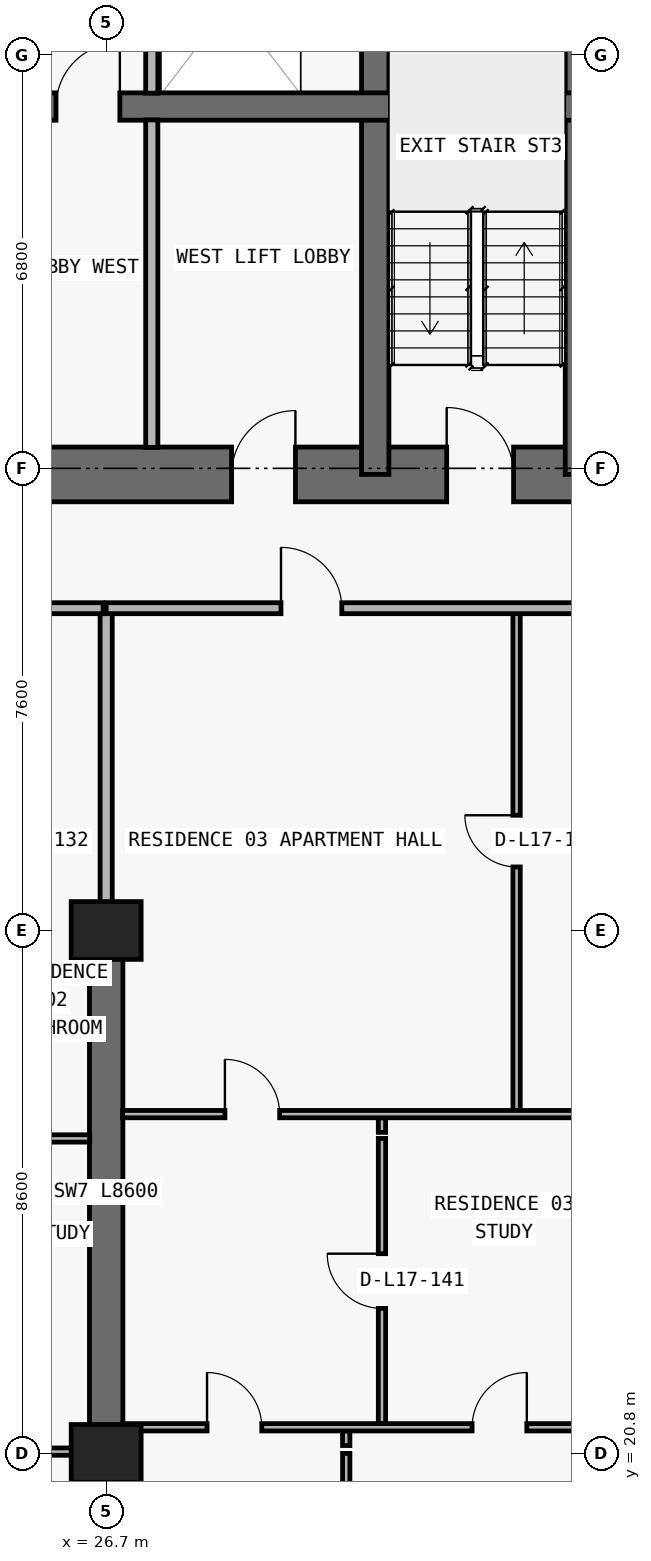
"""IFC4 building model, lengths in metres.
Left out: names, types, materials, properties, quantities, classifications, styles, units other than length and angle.
Written with IfcOpenShell. Run it as: python <this file> out.ifc"""

import sys

from ifc_helpers import new_model, si_unit, direction, frame, frame_2d, origin, origin_2d, place, context, subcontext, project, spatial, rectangle, extrude, element, fill, save


model = new_model("IFC4")
c1 = context("Model", 3, precision=1e-05, world=origin(), true_north=direction((0.0, 1.0)))
c2 = subcontext(c1, "Body", "Model", "MODEL_VIEW")
j1 = project(units=[si_unit("LENGTHUNIT", "METRE"), si_unit("PLANEANGLEUNIT", "RADIAN")], contexts=[c1])
p1 = place(None, origin())
s1 = spatial("IfcSite", under=j1, at=p1, CompositionType="ELEMENT")
p2 = place(p1, origin())
s2 = spatial("IfcBuilding", under=s1, at=p2, CompositionType="ELEMENT")
p3 = place(p2, frame((0.0, 0.0, 66.3)))
s3 = spatial("IfcBuildingStorey", under=s2, at=p3, CompositionType="ELEMENT", Elevation=66.3)
for number, where, z_axis, x_axis in (
    (1, (26.7, 20.8, 0.0), (0.0, 0.0, 1.0), (1.0, 0.0, 0.0)),
    (2, (26.7, 29.4, 0.0), (0.0, 0.0, 1.0), (1.0, 0.0, 0.0)),
):
    element("IfcColumn", number, at=place(p3, frame(where, z_axis=z_axis, x_axis=x_axis)), inside=s3, PredefinedType="COLUMN", context=c2, shape_type="SweptSolid", body=[
        extrude(rectangle(XDim=1.15, YDim=0.95, at=origin_2d()), origin(), (0.0, 0.0, 1.0), 3.05),
    ])
p4 = place(p3, frame((17.75, 36.9, 0.0), z_axis=(0.0, 0.0, 1.0), x_axis=(1.0, 0.0, 0.0)))
e3 = element("IfcWall", 3, at=p4, inside=s3, PredefinedType="SHEAR", context=c2, shape_type="SweptSolid", body=[
    extrude(rectangle(XDim=42.3, YDim=0.9, at=frame_2d((21.15, 0.0))), origin(), (0.0, 0.0, 1.0), 3.05),
])
p5 = place(p4, frame((14.55, 0.0, 0.0)))
e4 = element("IfcOpeningElement", 4, at=p5, cuts=e3, PredefinedType="OPENING", context=c2, shape_type="SweptSolid", body=[
    extrude(rectangle(XDim=1.1, YDim=2.15, at=frame_2d((0.55, 1.075))), frame((0.0, 0.46, 0.0), z_axis=(0.0, -1.0, 0.0), x_axis=(1.0, 0.0, 0.0)), (0.0, 0.0, 1.0), 0.92),
])
p6 = place(p4, frame((6.4, 0.0, 0.0)))
e5 = element("IfcOpeningElement", 5, at=p6, cuts=e3, PredefinedType="OPENING", context=c2, shape_type="SweptSolid", body=[
    extrude(rectangle(XDim=1.05, YDim=2.15, at=frame_2d((0.525, 1.075))), frame((0.0, 0.46, 0.0), z_axis=(0.0, -1.0, 0.0), x_axis=(1.0, 0.0, 0.0)), (0.0, 0.0, 1.0), 0.92),
])
p7 = place(p4, frame((34.9, 0.0, 0.0)))
e6 = element("IfcOpeningElement", 6, at=p7, cuts=e3, PredefinedType="OPENING", context=c2, shape_type="SweptSolid", body=[
    extrude(rectangle(XDim=1.05, YDim=2.15, at=frame_2d((0.525, 1.075))), frame((0.0, 0.46, 0.0), z_axis=(0.0, -1.0, 0.0), x_axis=(1.0, 0.0, 0.0)), (0.0, 0.0, 1.0), 0.92),
])
p8 = place(p4, frame((11.012, 0.0, 0.0)))
e7 = element("IfcOpeningElement", 7, at=p8, cuts=e3, PredefinedType="OPENING", context=c2, shape_type="SweptSolid", body=[
    extrude(rectangle(XDim=1.05, YDim=2.15, at=frame_2d((0.525, 1.075))), frame((0.0, 0.46, 0.0), z_axis=(0.0, -1.0, 0.0), x_axis=(1.0, 0.0, 0.0)), (0.0, 0.0, 1.0), 0.92),
])
p9 = place(p4, frame((24.25, 0.0, 0.0)))
e8 = element("IfcOpeningElement", 8, at=p9, cuts=e3, PredefinedType="OPENING", context=c2, shape_type="SweptSolid", body=[
    extrude(rectangle(XDim=1.05, YDim=2.15, at=frame_2d((0.525, 1.075))), frame((0.0, 0.46, 0.0), z_axis=(0.0, -1.0, 0.0), x_axis=(1.0, 0.0, 0.0)), (0.0, 0.0, 1.0), 0.92),
])
p10 = place(p3, frame((31.125, 36.9, 0.0), z_axis=(0.0, 0.0, 1.0), x_axis=(0.0, 1.0, 0.0)))
e9 = element("IfcWall", 9, at=p10, inside=s3, PredefinedType="SHEAR", context=c2, shape_type="SweptSolid", body=[
    extrude(rectangle(XDim=9.675, YDim=0.45, at=frame_2d((4.837, 0.0))), origin(), (0.0, 0.0, 1.0), 3.05),
])
p11 = place(p3, frame((34.6, 36.9, 0.0), z_axis=(0.0, 0.0, 1.0), x_axis=(0.0, 1.0, 0.0)))
e10 = element("IfcWall", 10, at=p11, inside=s3, PredefinedType="SHEAR", context=c2, shape_type="SweptSolid", body=[
    extrude(rectangle(XDim=9.675, YDim=0.7, at=frame_2d((4.837, 0.0))), origin(), (0.0, 0.0, 1.0), 3.05),
])
p12 = place(p3, frame((22.25, 42.95, 0.0), z_axis=(0.0, 0.0, 1.0), x_axis=(1.0, 0.0, 0.0)))
e11 = element("IfcWall", 11, at=p12, inside=s3, PredefinedType="SHEAR", context=c2, shape_type="SweptSolid", body=[
    extrude(rectangle(XDim=33.3, YDim=0.45, at=frame_2d((16.65, 0.0))), origin(), (0.0, 0.0, 1.0), 3.05),
])
p13 = place(p12, frame((1.05, 0.0, 0.0)))
e12 = element("IfcOpeningElement", 12, at=p13, cuts=e11, PredefinedType="OPENING", context=c2, shape_type="SweptSolid", body=[
    extrude(rectangle(XDim=1.2, YDim=2.2, at=frame_2d((0.6, 1.1))), frame((0.0, 0.235, 0.0), z_axis=(0.0, -1.0, 0.0), x_axis=(1.0, 0.0, 0.0)), (0.0, 0.0, 1.0), 0.47),
])
p14 = place(p12, frame((31.05, 0.0, 0.0)))
e13 = element("IfcOpeningElement", 13, at=p14, cuts=e11, PredefinedType="OPENING", context=c2, shape_type="SweptSolid", body=[
    extrude(rectangle(XDim=1.2, YDim=2.2, at=frame_2d((0.6, 1.1))), frame((0.0, 0.235, 0.0), z_axis=(0.0, -1.0, 0.0), x_axis=(1.0, 0.0, 0.0)), (0.0, 0.0, 1.0), 0.47),
])
p15 = place(p12, frame((13.5, 0.0, 0.0)))
e14 = element("IfcOpeningElement", 14, at=p15, cuts=e11, PredefinedType="OPENING", context=c2, shape_type="SweptSolid", body=[
    extrude(rectangle(XDim=1.1, YDim=2.2, at=frame_2d((0.55, 1.1))), frame((0.0, 0.235, 0.0), z_axis=(0.0, -1.0, 0.0), x_axis=(1.0, 0.0, 0.0)), (0.0, 0.0, 1.0), 0.47),
])
p16 = place(p12, frame((16.1, 0.0, 0.0)))
e15 = element("IfcOpeningElement", 15, at=p16, cuts=e11, PredefinedType="OPENING", context=c2, shape_type="SweptSolid", body=[
    extrude(rectangle(XDim=1.1, YDim=2.2, at=frame_2d((0.55, 1.1))), frame((0.0, 0.235, 0.0), z_axis=(0.0, -1.0, 0.0), x_axis=(1.0, 0.0, 0.0)), (0.0, 0.0, 1.0), 0.47),
])
p17 = place(p12, frame((18.7, 0.0, 0.0)))
e16 = element("IfcOpeningElement", 16, at=p17, cuts=e11, PredefinedType="OPENING", context=c2, shape_type="SweptSolid", body=[
    extrude(rectangle(XDim=1.1, YDim=2.2, at=frame_2d((0.55, 1.1))), frame((0.0, 0.235, 0.0), z_axis=(0.0, -1.0, 0.0), x_axis=(1.0, 0.0, 0.0)), (0.0, 0.0, 1.0), 0.47),
])
p18 = place(p12, frame((3.625, 0.0, 0.0)))
e17 = element("IfcOpeningElement", 17, at=p18, cuts=e11, PredefinedType="OPENING", context=c2, shape_type="SweptSolid", body=[
    extrude(rectangle(XDim=1.05, YDim=2.15, at=frame_2d((0.525, 1.075))), frame((0.0, 0.235, 0.0), z_axis=(0.0, -1.0, 0.0), x_axis=(1.0, 0.0, 0.0)), (0.0, 0.0, 1.0), 0.47),
])
p19 = place(p12, frame((28.675, 0.0, 0.0)))
e18 = element("IfcOpeningElement", 18, at=p19, cuts=e11, PredefinedType="OPENING", context=c2, shape_type="SweptSolid", body=[
    extrude(rectangle(XDim=1.05, YDim=2.15, at=frame_2d((0.525, 1.075))), frame((0.0, 0.235, 0.0), z_axis=(0.0, -1.0, 0.0), x_axis=(1.0, 0.0, 0.0)), (0.0, 0.0, 1.0), 0.47),
])
p20 = place(p3, frame((26.7, 20.8, 0.0), z_axis=(0.0, 0.0, 1.0), x_axis=(0.0, 1.0, 0.0)))
e19 = element("IfcWall", 19, at=p20, inside=s3, PredefinedType="SHEAR", context=c2, shape_type="SweptSolid", body=[
    extrude(rectangle(XDim=8.6, YDim=0.55, at=frame_2d((4.3, 0.0))), origin(), (0.0, 0.0, 1.0), 3.05),
])
p21 = place(p3, frame((26.7, 6.24, 0.0), z_axis=(0.0, 0.0, 1.0), x_axis=(0.0, 1.0, 0.0)))
e20 = element("IfcWall", 20, at=p21, inside=s3, PredefinedType="PARTITIONING", context=c2, shape_type="SweptSolid", body=[
    extrude(rectangle(XDim=14.555, YDim=0.2, at=frame_2d((7.277, 0.0))), origin(), (0.0, 0.0, 1.0), 2.11),
])
p22 = place(p3, frame((26.7, 29.405, 0.0), z_axis=(0.0, 0.0, 1.0), x_axis=(0.0, 1.0, 0.0)))
e21 = element("IfcWall", 21, at=p22, inside=s3, PredefinedType="PARTITIONING", context=c2, shape_type="SweptSolid", body=[
    extrude(rectangle(XDim=5.295, YDim=0.2, at=frame_2d((2.647, 0.0))), origin(), (0.0, 0.0, 1.0), 2.335),
])
p23 = place(p3, frame((27.45, 37.345, 0.0), z_axis=(0.0, 0.0, 1.0), x_axis=(0.0, 1.0, 0.0)))
e22 = element("IfcWall", 22, at=p23, inside=s3, PredefinedType="PARTITIONING", context=c2, shape_type="SweptSolid", body=[
    extrude(rectangle(XDim=5.385, YDim=0.2, at=frame_2d((2.692, 0.0))), origin(), (0.0, 0.0, 1.0), 3.05),
])
p24 = place(p3, frame((27.45, 43.17, 0.0), z_axis=(0.0, 0.0, 1.0), x_axis=(0.0, 1.0, 0.0)))
e23 = element("IfcWall", 23, at=p24, inside=s3, PredefinedType="PARTITIONING", context=c2, shape_type="SweptSolid", body=[
    extrude(rectangle(XDim=3.185, YDim=0.2, at=frame_2d((1.593, 0.0))), origin(), (0.0, 0.0, 1.0), 3.05),
])
p25 = place(p3, frame((30.648, 6.24, 0.0), z_axis=(0.0, 0.0, 1.0), x_axis=(0.0, 1.0, 0.0)))
e24 = element("IfcWall", 24, at=p25, inside=s3, PredefinedType="PARTITIONING", context=c2, shape_type="SweptSolid", body=[
    extrude(rectangle(XDim=14.56, YDim=0.12, at=frame_2d((7.28, 0.0))), origin(), (0.0, 0.0, 1.0), 2.423),
])
p26 = place(p3, frame((30.648, 20.93, 0.0), z_axis=(0.0, 0.0, 1.0), x_axis=(0.0, 1.0, 0.0)))
e25 = element("IfcWall", 25, at=p26, inside=s3, PredefinedType="PARTITIONING", context=c2, shape_type="SweptSolid", body=[
    extrude(rectangle(XDim=0.24, YDim=0.12, at=frame_2d((0.12, 0.0))), origin(), (0.0, 0.0, 1.0), 2.423),
])
p27 = place(p3, frame((31.236, 21.29, 0.0), z_axis=(0.0, 0.0, 1.0), x_axis=(0.0, 1.0, 0.0)))
e26 = element("IfcWall", 26, at=p27, inside=s3, PredefinedType="PARTITIONING", context=c2, shape_type="SweptSolid", body=[
    extrude(rectangle(XDim=4.69, YDim=0.12, at=frame_2d((2.345, 0.0))), origin(), (0.0, 0.0, 1.0), 3.05),
])
p28 = place(p27, frame((1.895, 0.0, 0.0)))
e27 = element("IfcOpeningElement", 27, at=p28, cuts=e26, PredefinedType="OPENING", context=c2, shape_type="SweptSolid", body=[
    extrude(rectangle(XDim=0.9, YDim=2.15, at=frame_2d((0.45, 1.075))), frame((0.0, 0.07, 0.0), z_axis=(0.0, -1.0, 0.0), x_axis=(1.0, 0.0, 0.0)), (0.0, 0.0, 1.0), 0.14),
])
p29 = place(p3, frame((31.236, 26.08, 0.0), z_axis=(0.0, 0.0, 1.0), x_axis=(0.0, 1.0, 0.0)))
e28 = element("IfcWall", 28, at=p29, inside=s3, PredefinedType="PARTITIONING", context=c2, shape_type="SweptSolid", body=[
    extrude(rectangle(XDim=0.24, YDim=0.12, at=frame_2d((0.12, 0.0))), origin(), (0.0, 0.0, 1.0), 3.05),
])
p30 = place(p3, frame((33.45, 26.44, 0.0), z_axis=(0.0, 0.0, 1.0), x_axis=(0.0, 1.0, 0.0)))
e29 = element("IfcWall", 29, at=p30, inside=s3, PredefinedType="PARTITIONING", context=c2, shape_type="SweptSolid", body=[
    extrude(rectangle(XDim=8.26, YDim=0.12, at=frame_2d((4.13, 0.0))), origin(), (0.0, 0.0, 1.0), 3.05),
])
p31 = place(p30, frame((4.005, 0.0, 0.0)))
e30 = element("IfcOpeningElement", 30, at=p31, cuts=e29, PredefinedType="OPENING", context=c2, shape_type="SweptSolid", body=[
    extrude(rectangle(XDim=0.85, YDim=2.1, at=frame_2d((0.425, 1.05))), frame((0.0, 0.07, 0.0), z_axis=(0.0, -1.0, 0.0), x_axis=(1.0, 0.0, 0.0)), (0.0, 0.0, 1.0), 0.14),
])
p32 = place(p3, frame((18.3, 20.83, 0.0), z_axis=(0.0, 0.0, 1.0), x_axis=(1.0, 0.0, 0.0)))
e31 = element("IfcWall", 31, at=p32, inside=s3, PredefinedType="PARTITIONING", context=c2, shape_type="SweptSolid", body=[
    extrude(rectangle(XDim=8.13, YDim=0.12, at=frame_2d((4.065, 0.0))), origin(), (0.0, 0.0, 1.0), 2.11),
])
p33 = place(p32, frame((1.693, 0.0, 0.0)))
e32 = element("IfcOpeningElement", 32, at=p33, cuts=e31, PredefinedType="OPENING", context=c2, shape_type="SweptSolid", body=[
    extrude(rectangle(XDim=0.9, YDim=2.06, at=frame_2d((0.45, 1.03))), frame((0.0, 0.07, 0.0), z_axis=(0.0, -1.0, 0.0), x_axis=(1.0, 0.0, 0.0)), (0.0, 0.0, 1.0), 0.14),
])
p34 = place(p32, frame((5.925, 0.0, 0.0)))
e33 = element("IfcOpeningElement", 33, at=p34, cuts=e31, PredefinedType="OPENING", context=c2, shape_type="SweptSolid", body=[
    extrude(rectangle(XDim=0.9, YDim=2.06, at=frame_2d((0.45, 1.03))), frame((0.0, 0.07, 0.0), z_axis=(0.0, -1.0, 0.0), x_axis=(1.0, 0.0, 0.0)), (0.0, 0.0, 1.0), 0.14),
])
p35 = place(p3, frame((26.97, 21.23, 0.0), z_axis=(0.0, 0.0, 1.0), x_axis=(1.0, 0.0, 0.0)))
e34 = element("IfcWall", 34, at=p35, inside=s3, PredefinedType="PARTITIONING", context=c2, shape_type="SweptSolid", body=[
    extrude(rectangle(XDim=8.13, YDim=0.12, at=frame_2d((4.065, 0.0))), origin(), (0.0, 0.0, 1.0), 3.05),
])
p36 = place(p35, frame((1.389, 0.0, 0.0)))
e35 = element("IfcOpeningElement", 35, at=p36, cuts=e34, PredefinedType="OPENING", context=c2, shape_type="SweptSolid", body=[
    extrude(rectangle(XDim=0.9, YDim=2.15, at=frame_2d((0.45, 1.075))), frame((0.0, 0.07, 0.0), z_axis=(0.0, -1.0, 0.0), x_axis=(1.0, 0.0, 0.0)), (0.0, 0.0, 1.0), 0.14),
])
p37 = place(p35, frame((5.748, 0.0, 0.0)))
e36 = element("IfcOpeningElement", 36, at=p37, cuts=e34, PredefinedType="OPENING", context=c2, shape_type="SweptSolid", body=[
    extrude(rectangle(XDim=0.9, YDim=2.15, at=frame_2d((0.45, 1.075))), frame((0.0, 0.07, 0.0), z_axis=(0.0, -1.0, 0.0), x_axis=(1.0, 0.0, 0.0)), (0.0, 0.0, 1.0), 0.14),
])
p38 = place(p3, frame((18.3, 25.98, 0.0), z_axis=(0.0, 0.0, 1.0), x_axis=(1.0, 0.0, 0.0)))
e37 = element("IfcWall", 37, at=p38, inside=s3, PredefinedType="PARTITIONING", context=c2, shape_type="SweptSolid", body=[
    extrude(rectangle(XDim=8.13, YDim=0.12, at=frame_2d((4.065, 0.0))), origin(), (0.0, 0.0, 1.0), 3.05),
])
p39 = place(p38, frame((1.693, 0.0, 0.0)))
e38 = element("IfcOpeningElement", 38, at=p39, cuts=e37, PredefinedType="OPENING", context=c2, shape_type="SweptSolid", body=[
    extrude(rectangle(XDim=0.9, YDim=2.15, at=frame_2d((0.45, 1.075))), frame((0.0, 0.07, 0.0), z_axis=(0.0, -1.0, 0.0), x_axis=(1.0, 0.0, 0.0)), (0.0, 0.0, 1.0), 0.14),
])
p40 = place(p3, frame((26.97, 26.38, 0.0), z_axis=(0.0, 0.0, 1.0), x_axis=(1.0, 0.0, 0.0)))
e39 = element("IfcWall", 39, at=p40, inside=s3, PredefinedType="PARTITIONING", context=c2, shape_type="SweptSolid", body=[
    extrude(rectangle(XDim=8.13, YDim=0.12, at=frame_2d((4.065, 0.0))), origin(), (0.0, 0.0, 1.0), 3.05),
])
p41 = place(p40, frame((1.683, 0.0, 0.0)))
e40 = element("IfcOpeningElement", 40, at=p41, cuts=e39, PredefinedType="OPENING", context=c2, shape_type="SweptSolid", body=[
    extrude(rectangle(XDim=0.9, YDim=2.15, at=frame_2d((0.45, 1.075))), frame((0.0, 0.07, 0.0), z_axis=(0.0, -1.0, 0.0), x_axis=(1.0, 0.0, 0.0)), (0.0, 0.0, 1.0), 0.14),
])
p42 = place(p3, frame((5.105, 34.7, 0.0), z_axis=(0.0, 0.0, 1.0), x_axis=(1.0, 0.0, 0.0)))
e41 = element("IfcWall", 41, at=p42, inside=s3, PredefinedType="PARTITIONING", context=c2, shape_type="SweptSolid", body=[
    extrude(rectangle(XDim=21.545, YDim=0.18, at=frame_2d((10.772, 0.0))), origin(), (0.0, 0.0, 1.0), 3.05),
])
p43 = place(p42, frame((7.67, 0.0, 0.0)))
e42 = element("IfcOpeningElement", 42, at=p43, cuts=e41, PredefinedType="OPENING", context=c2, shape_type="SweptSolid", body=[
    extrude(rectangle(XDim=1.0, YDim=2.2, at=frame_2d((0.5, 1.1))), frame((0.0, 0.1, 0.0), z_axis=(0.0, -1.0, 0.0), x_axis=(1.0, 0.0, 0.0)), (0.0, 0.0, 1.0), 0.2),
])
p44 = place(p42, frame((16.07, 0.0, 0.0)))
e43 = element("IfcOpeningElement", 43, at=p44, cuts=e41, PredefinedType="OPENING", context=c2, shape_type="SweptSolid", body=[
    extrude(rectangle(XDim=1.0, YDim=2.2, at=frame_2d((0.5, 1.1))), frame((0.0, 0.1, 0.0), z_axis=(0.0, -1.0, 0.0), x_axis=(1.0, 0.0, 0.0)), (0.0, 0.0, 1.0), 0.2),
])
p45 = place(p3, frame((26.7, 34.7, 0.0), z_axis=(0.0, 0.0, 1.0), x_axis=(1.0, 0.0, 0.0)))
e44 = element("IfcWall", 44, at=p45, inside=s3, PredefinedType="PARTITIONING", context=c2, shape_type="SweptSolid", body=[
    extrude(rectangle(XDim=46.0, YDim=0.18, at=frame_2d((23.0, 0.0))), origin(), (0.0, 0.0, 1.0), 3.05),
])
p46 = place(p45, frame((2.875, 0.0, 0.0)))
e45 = element("IfcOpeningElement", 45, at=p46, cuts=e44, PredefinedType="OPENING", context=c2, shape_type="SweptSolid", body=[
    extrude(rectangle(XDim=1.0, YDim=2.2, at=frame_2d((0.5, 1.1))), frame((0.0, 0.1, 0.0), z_axis=(0.0, -1.0, 0.0), x_axis=(1.0, 0.0, 0.0)), (0.0, 0.0, 1.0), 0.2),
])
p47 = place(p45, frame((10.875, 0.0, 0.0)))
e46 = element("IfcOpeningElement", 46, at=p47, cuts=e44, PredefinedType="OPENING", context=c2, shape_type="SweptSolid", body=[
    extrude(rectangle(XDim=1.0, YDim=2.2, at=frame_2d((0.5, 1.1))), frame((0.0, 0.1, 0.0), z_axis=(0.0, -1.0, 0.0), x_axis=(1.0, 0.0, 0.0)), (0.0, 0.0, 1.0), 0.2),
])
p48 = place(p45, frame((18.875, 0.0, 0.0)))
e47 = element("IfcOpeningElement", 47, at=p48, cuts=e44, PredefinedType="OPENING", context=c2, shape_type="SweptSolid", body=[
    extrude(rectangle(XDim=1.0, YDim=2.2, at=frame_2d((0.5, 1.1))), frame((0.0, 0.1, 0.0), z_axis=(0.0, -1.0, 0.0), x_axis=(1.0, 0.0, 0.0)), (0.0, 0.0, 1.0), 0.2),
])
p49 = place(p45, frame((27.275, 0.0, 0.0)))
e48 = element("IfcOpeningElement", 48, at=p49, cuts=e44, PredefinedType="OPENING", context=c2, shape_type="SweptSolid", body=[
    extrude(rectangle(XDim=1.0, YDim=2.2, at=frame_2d((0.5, 1.1))), frame((0.0, 0.1, 0.0), z_axis=(0.0, -1.0, 0.0), x_axis=(1.0, 0.0, 0.0)), (0.0, 0.0, 1.0), 0.2),
])
p50 = place(p45, frame((35.675, 0.0, 0.0)))
e49 = element("IfcOpeningElement", 49, at=p50, cuts=e44, PredefinedType="OPENING", context=c2, shape_type="SweptSolid", body=[
    extrude(rectangle(XDim=1.0, YDim=2.2, at=frame_2d((0.5, 1.1))), frame((0.0, 0.1, 0.0), z_axis=(0.0, -1.0, 0.0), x_axis=(1.0, 0.0, 0.0)), (0.0, 0.0, 1.0), 0.2),
])
p51 = place(p5, origin())
e50 = element("IfcDoor", 50, at=p51, inside=s3, OperationType="SINGLE_SWING_LEFT", PredefinedType="DOOR", context=c2, shape_type="SweptSolid", body=[
    extrude(rectangle(XDim=1.1, YDim=2.15, at=frame_2d((0.55, 1.075))), frame((0.0, 0.025, 0.0), z_axis=(0.0, -1.0, 0.0), x_axis=(1.0, 0.0, 0.0)), (0.0, 0.0, 1.0), 0.05),
])
fill(e4, e50)
p52 = place(p18, origin())
e51 = element("IfcDoor", 51, at=p52, inside=s3, OperationType="SINGLE_SWING_RIGHT", PredefinedType="DOOR", context=c2, shape_type="SweptSolid", body=[
    extrude(rectangle(XDim=1.05, YDim=2.15, at=frame_2d((0.525, 1.075))), frame((0.0, 0.025, 0.0), z_axis=(0.0, -1.0, 0.0), x_axis=(1.0, 0.0, 0.0)), (0.0, 0.0, 1.0), 0.05),
])
fill(e17, e51)
p53 = place(p8, origin())
e52 = element("IfcDoor", 52, at=p53, inside=s3, OperationType="SINGLE_SWING_RIGHT", PredefinedType="DOOR", context=c2, shape_type="SweptSolid", body=[
    extrude(rectangle(XDim=1.05, YDim=2.15, at=frame_2d((0.525, 1.075))), frame((0.0, 0.025, 0.0), z_axis=(0.0, -1.0, 0.0), x_axis=(1.0, 0.0, 0.0)), (0.0, 0.0, 1.0), 0.05),
])
fill(e7, e52)
p54 = place(p46, origin())
e53 = element("IfcDoor", 53, at=p54, inside=s3, OperationType="SINGLE_SWING_LEFT", PredefinedType="DOOR", context=c2, shape_type="SweptSolid", body=[
    extrude(rectangle(XDim=1.0, YDim=2.2, at=frame_2d((0.5, 1.1))), frame((0.0, 0.025, 0.0), z_axis=(0.0, -1.0, 0.0), x_axis=(1.0, 0.0, 0.0)), (0.0, 0.0, 1.0), 0.05),
])
fill(e45, e53)
p55 = place(p31, origin())
e54 = element("IfcDoor", 54, at=p55, inside=s3, OperationType="SINGLE_SWING_RIGHT", PredefinedType="DOOR", context=c2, shape_type="SweptSolid", body=[
    extrude(rectangle(XDim=0.85, YDim=2.1, at=frame_2d((0.425, 1.05))), frame((0.0, 0.025, 0.0), z_axis=(0.0, -1.0, 0.0), x_axis=(1.0, 0.0, 0.0)), (0.0, 0.0, 1.0), 0.05),
])
fill(e30, e54)
p56 = place(p41, origin())
e55 = element("IfcDoor", 55, at=p56, inside=s3, OperationType="SINGLE_SWING_LEFT", PredefinedType="DOOR", context=c2, shape_type="SweptSolid", body=[
    extrude(rectangle(XDim=0.9, YDim=2.15, at=frame_2d((0.45, 1.075))), frame((0.0, 0.025, 0.0), z_axis=(0.0, -1.0, 0.0), x_axis=(1.0, 0.0, 0.0)), (0.0, 0.0, 1.0), 0.05),
])
fill(e40, e55)
p57 = place(p28, origin())
e56 = element("IfcDoor", 56, at=p57, inside=s3, OperationType="SINGLE_SWING_RIGHT", PredefinedType="DOOR", context=c2, shape_type="SweptSolid", body=[
    extrude(rectangle(XDim=0.9, YDim=2.15, at=frame_2d((0.45, 1.075))), frame((0.0, 0.025, 0.0), z_axis=(0.0, -1.0, 0.0), x_axis=(1.0, 0.0, 0.0)), (0.0, 0.0, 1.0), 0.05),
])
fill(e27, e56)
p58 = place(p36, origin())
e57 = element("IfcDoor", 57, at=p58, inside=s3, OperationType="SINGLE_SWING_LEFT", PredefinedType="DOOR", context=c2, shape_type="SweptSolid", body=[
    extrude(rectangle(XDim=0.9, YDim=2.15, at=frame_2d((0.45, 1.075))), frame((0.0, 0.025, 0.0), z_axis=(0.0, -1.0, 0.0), x_axis=(1.0, 0.0, 0.0)), (0.0, 0.0, 1.0), 0.05),
])
fill(e35, e57)
p59 = place(p37, origin())
e58 = element("IfcDoor", 58, at=p59, inside=s3, OperationType="SINGLE_SWING_RIGHT", PredefinedType="DOOR", context=c2, shape_type="SweptSolid", body=[
    extrude(rectangle(XDim=0.9, YDim=2.15, at=frame_2d((0.45, 1.075))), frame((0.0, 0.025, 0.0), z_axis=(0.0, -1.0, 0.0), x_axis=(1.0, 0.0, 0.0)), (0.0, 0.0, 1.0), 0.05),
])
fill(e36, e58)
save(model, sys.argv[1])
